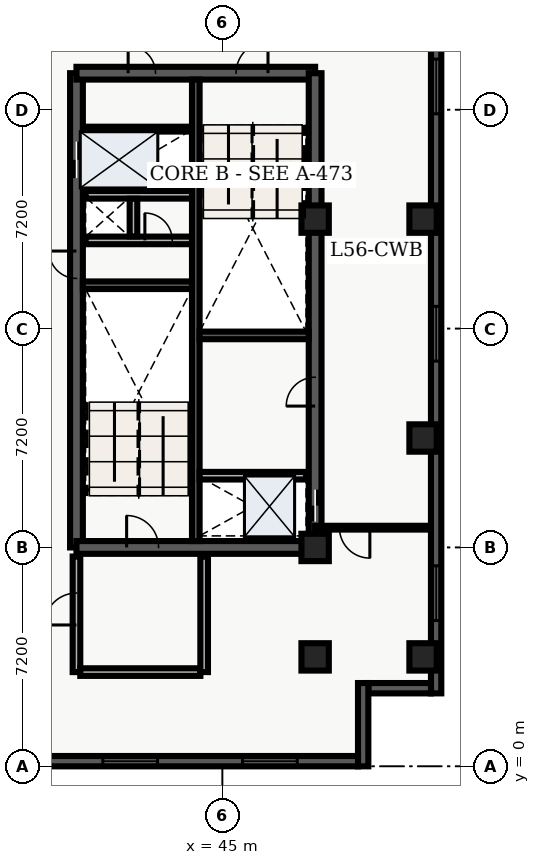
"""IFC4 building model, lengths in metres.
Left out: names, types, materials, properties, quantities, classifications, styles, units other than length and angle.
Written with IfcOpenShell. Run it as: python <this file> out.ifc"""

import sys

from ifc_helpers import new_model, entity, si_unit, converted_unit, direction, frame, origin_with_axes, origin_2d_with_axis, place, context, subcontext, project, spatial, polyline, rectangle, outline, extrude, element, fill, save


model = new_model("IFC4")
c1 = context("Model", 3, precision=1e-05, world=origin_with_axes(), true_north=direction((0.0, 1.0)))
c2 = subcontext(c1, "Body", "Model", "MODEL_VIEW")
j1 = project(units=[si_unit("LENGTHUNIT", "METRE"), converted_unit("PLANEANGLEUNIT", "DEGREE", entity("IfcPlaneAngleMeasure", 0.017), si_unit("PLANEANGLEUNIT", "RADIAN"), dimensions=[0, 0, 0, 0, 0, 0, 0])], contexts=[c1])
p1 = place(None, origin_with_axes())
s1 = spatial("IfcSite", under=j1, at=p1, CompositionType="ELEMENT")
p2 = place(p1, origin_with_axes())
s2 = spatial("IfcBuilding", under=s1, at=p2, CompositionType="ELEMENT")
p3 = place(p2, frame((0.0, 0.0, 228.6), z_axis=(0.0, 0.0, 1.0), x_axis=(1.0, 0.0, 0.0)))
s3 = spatial("IfcBuildingStorey", under=s2, at=p3, CompositionType="ELEMENT", Elevation=228.6)
p4 = place(p3, frame((40.2, 7.2, 0.0), z_axis=(0.0, 0.0, 1.0), x_axis=(0.0, 1.0, 0.0)))
e1 = element("IfcWall", 1, at=p4, inside=s3, PredefinedType="SHEAR", context=c2, shape_type="SweptSolid", body=[
    extrude(outline(polyline([(0.0, -0.21), (15.6, -0.21), (15.6, 0.21), (0.0, 0.21), (0.0, -0.21)])), origin_with_axes(), (0.0, 0.0, 1.0), 3.66),
])
p5 = place(p4, frame((12.75, 0.0, 0.0), z_axis=(0.0, 0.0, 1.0), x_axis=(1.0, 0.0, 0.0)))
e2 = element("IfcOpeningElement", 2, at=p5, cuts=e1, PredefinedType="OPENING", context=c2, shape_type="SweptSolid", body=[
    extrude(rectangle(XDim=1.2, YDim=0.44, at=origin_2d_with_axis()), origin_with_axes(), (0.0, 0.0, 1.0), 2.15),
])
p6 = place(p4, frame((9.3, 0.0, 0.0), z_axis=(0.0, 0.0, 1.0), x_axis=(1.0, 0.0, 0.0)))
e3 = element("IfcOpeningElement", 3, at=p6, cuts=e1, PredefinedType="OPENING", context=c2, shape_type="SweptSolid", body=[
    extrude(rectangle(XDim=0.9, YDim=0.44, at=origin_2d_with_axis()), origin_with_axes(), (0.0, 0.0, 1.0), 2.15),
])
p7 = place(p3, frame((40.2, 7.2, 0.0), z_axis=(0.0, 0.0, 1.0), x_axis=(1.0, 0.0, 0.0)))
e4 = element("IfcWall", 4, at=p7, inside=s3, PredefinedType="SHEAR", context=c2, shape_type="SweptSolid", body=[
    extrude(outline(polyline([(0.0, -0.21), (7.85, -0.21), (7.85, 0.21), (0.0, 0.21), (0.0, -0.21)])), origin_with_axes(), (0.0, 0.0, 1.0), 3.66),
])
p8 = place(p7, frame((2.175, 0.0, 0.0), z_axis=(0.0, 0.0, 1.0), x_axis=(1.0, 0.0, 0.0)))
e5 = element("IfcOpeningElement", 5, at=p8, cuts=e4, PredefinedType="OPENING", context=c2, shape_type="SweptSolid", body=[
    extrude(rectangle(XDim=1.05, YDim=0.44, at=origin_2d_with_axis()), origin_with_axes(), (0.0, 0.0, 1.0), 2.15),
])
p9 = place(p3, frame((40.2, 22.8, 0.0), z_axis=(0.0, 0.0, 1.0), x_axis=(1.0, 0.0, 0.0)))
e6 = element("IfcWall", 6, at=p9, inside=s3, PredefinedType="SHEAR", context=c2, shape_type="SweptSolid", body=[
    extrude(outline(polyline([(0.0, -0.21), (7.85, -0.21), (7.85, 0.21), (0.0, 0.21), (0.0, -0.21)])), origin_with_axes(), (0.0, 0.0, 1.0), 3.66),
])
p10 = place(p9, frame((5.775, 0.0, 0.0), z_axis=(0.0, 0.0, 1.0), x_axis=(1.0, 0.0, 0.0)))
e7 = element("IfcOpeningElement", 7, at=p10, cuts=e6, PredefinedType="OPENING", context=c2, shape_type="SweptSolid", body=[
    extrude(rectangle(XDim=1.05, YDim=0.44, at=origin_2d_with_axis()), origin_with_axes(), (0.0, 0.0, 1.0), 2.15),
])
p11 = place(p9, frame((2.15, 0.0, 0.0), z_axis=(0.0, 0.0, 1.0), x_axis=(1.0, 0.0, 0.0)))
e8 = element("IfcOpeningElement", 8, at=p11, cuts=e6, PredefinedType="OPENING", context=c2, shape_type="SweptSolid", body=[
    extrude(rectangle(XDim=0.9, YDim=0.44, at=origin_2d_with_axis()), origin_with_axes(), (0.0, 0.0, 1.0), 2.15),
])
p12 = place(p3, frame((48.05, 7.2, 0.0), z_axis=(0.0, 0.0, 1.0), x_axis=(0.0, 1.0, 0.0)))
e9 = element("IfcWall", 9, at=p12, inside=s3, PredefinedType="SHEAR", context=c2, shape_type="SweptSolid", body=[
    extrude(outline(polyline([(0.0, -0.21), (15.6, -0.21), (15.6, 0.21), (0.0, 0.21), (0.0, -0.21)])), origin_with_axes(), (0.0, 0.0, 1.0), 3.66),
])
p13 = place(p12, frame((1.375, 0.0, 0.0), z_axis=(0.0, 0.0, 1.0), x_axis=(1.0, 0.0, 0.0)))
e10 = element("IfcOpeningElement", 10, at=p13, cuts=e9, PredefinedType="OPENING", context=c2, shape_type="SweptSolid", body=[
    extrude(rectangle(XDim=1.05, YDim=0.44, at=origin_2d_with_axis()), origin_with_axes(), (0.0, 0.0, 1.0), 2.15),
])
p14 = place(p12, frame((5.125, 0.0, 0.0), z_axis=(0.0, 0.0, 1.0), x_axis=(1.0, 0.0, 0.0)))
e11 = element("IfcOpeningElement", 11, at=p14, cuts=e9, PredefinedType="OPENING", context=c2, shape_type="SweptSolid", body=[
    extrude(rectangle(XDim=0.95, YDim=0.44, at=origin_2d_with_axis()), origin_with_axes(), (0.0, 0.0, 1.0), 2.15),
])
p15 = place(p3, frame((44.125, 7.41, 0.0), z_axis=(0.0, 0.0, 1.0), x_axis=(0.0, 1.0, 0.0)))
e12 = element("IfcWall", 12, at=p15, inside=s3, PredefinedType="SHEAR", context=c2, shape_type="SweptSolid", body=[
    extrude(outline(polyline([(0.0, -0.125), (15.18, -0.125), (15.18, 0.125), (0.0, 0.125), (0.0, -0.125)])), origin_with_axes(), (0.0, 0.0, 1.0), 3.66),
])
for number, where, z_axis, x_axis in (
    (13, (40.41, 15.825, 0.0), (0.0, 0.0, 1.0), (1.0, 0.0, 0.0)),
    (14, (44.25, 14.175, 0.0), (0.0, 0.0, 1.0), (1.0, 0.0, 0.0)),
):
    element("IfcWall", number, at=place(p3, frame(where, z_axis=z_axis, x_axis=x_axis)), inside=s3, PredefinedType="SHEAR", context=c2, shape_type="SweptSolid", body=[
        extrude(outline(polyline([(0.0, -0.125), (3.59, -0.125), (3.59, 0.125), (0.0, 0.125), (0.0, -0.125)])), origin_with_axes(), (0.0, 0.0, 1.0), 3.66),
    ])
p16 = place(p3, frame((40.5, 17.3, 0.0), z_axis=(0.0, 0.0, 1.0), x_axis=(1.0, 0.0, 0.0)))
e15 = element("IfcWall", 15, at=p16, inside=s3, PredefinedType="SOLIDWALL", context=c2, shape_type="SweptSolid", body=[
    extrude(outline(polyline([(0.0, -0.125), (3.5, -0.125), (3.5, 0.125), (0.0, 0.125), (0.0, -0.125)])), origin_with_axes(), (0.0, 0.0, 1.0), 2.7),
])
p17 = place(p16, frame((2.4, 0.0, 0.0), z_axis=(0.0, 0.0, 1.0), x_axis=(1.0, 0.0, 0.0)))
e16 = element("IfcOpeningElement", 16, at=p17, cuts=e15, PredefinedType="OPENING", context=c2, shape_type="SweptSolid", body=[
    extrude(rectangle(XDim=0.9, YDim=0.27, at=origin_2d_with_axis()), origin_with_axes(), (0.0, 0.0, 1.0), 2.15),
])
p18 = place(p3, frame((40.5, 18.8, 0.0), z_axis=(0.0, 0.0, 1.0), x_axis=(1.0, 0.0, 0.0)))
e17 = element("IfcWall", 17, at=p18, inside=s3, PredefinedType="SOLIDWALL", context=c2, shape_type="SweptSolid", body=[
    extrude(outline(polyline([(0.0, -0.125), (3.5, -0.125), (3.5, 0.125), (0.0, 0.125), (0.0, -0.125)])), origin_with_axes(), (0.0, 0.0, 1.0), 2.7),
])
p19 = place(p3, frame((42.075, 17.43, 0.0), z_axis=(0.0, 0.0, 1.0), x_axis=(0.0, 1.0, 0.0)))
e18 = element("IfcWall", 18, at=p19, inside=s3, PredefinedType="SOLIDWALL", context=c2, shape_type="SweptSolid", body=[
    extrude(outline(polyline([(0.0, -0.125), (1.24, -0.125), (1.24, 0.125), (0.0, 0.125), (0.0, -0.125)])), origin_with_axes(), (0.0, 0.0, 1.0), 2.7),
])
p20 = place(p3, frame((40.2, 3.1, 0.0), z_axis=(0.0, 0.0, 1.0), x_axis=(0.0, 1.0, 0.0)))
e19 = element("IfcWall", 19, at=p20, inside=s3, PredefinedType="SOLIDWALL", context=c2, shape_type="SweptSolid", body=[
    extrude(outline(polyline([(0.0, -0.125), (3.8, -0.125), (3.8, 0.125), (0.0, 0.125), (0.0, -0.125)])), origin_with_axes(), (0.0, 0.0, 1.0), 2.7),
])
p21 = place(p20, frame((2.075, 0.0, 0.0), z_axis=(0.0, 0.0, 1.0), x_axis=(1.0, 0.0, 0.0)))
e20 = element("IfcOpeningElement", 20, at=p21, cuts=e19, PredefinedType="OPENING", context=c2, shape_type="SweptSolid", body=[
    extrude(rectangle(XDim=1.05, YDim=0.27, at=origin_2d_with_axis()), origin_with_axes(), (0.0, 0.0, 1.0), 2.15),
])
p22 = place(p3, frame((40.325, 3.1, 0.0), z_axis=(0.0, 0.0, 1.0), x_axis=(1.0, 0.0, 0.0)))
e21 = element("IfcWall", 21, at=p22, inside=s3, PredefinedType="SOLIDWALL", context=c2, shape_type="SweptSolid", body=[
    extrude(outline(polyline([(0.0, -0.125), (3.95, -0.125), (3.95, 0.125), (0.0, 0.125), (0.0, -0.125)])), origin_with_axes(), (0.0, 0.0, 1.0), 2.7),
])
p23 = place(p3, frame((44.4, 3.1, 0.0), z_axis=(0.0, 0.0, 1.0), x_axis=(0.0, 1.0, 0.0)))
e22 = element("IfcWall", 22, at=p23, inside=s3, PredefinedType="SOLIDWALL", context=c2, shape_type="SweptSolid", body=[
    extrude(outline(polyline([(0.0, -0.125), (3.8, -0.125), (3.8, 0.125), (0.0, 0.125), (0.0, -0.125)])), origin_with_axes(), (0.0, 0.0, 1.0), 2.7),
])
for number, where, z_axis, x_axis in (
    (23, (48.05, 3.6, 0.0), (0.0, 0.0, 1.0), (1.0, 0.0, 0.0)),
    (24, (48.05, 7.2, 0.0), (0.0, 0.0, 1.0), (1.0, 0.0, 0.0)),
    (25, (48.05, 18.0, 0.0), (0.0, 0.0, 1.0), (1.0, 0.0, 0.0)),
    (26, (51.6, 3.6, 0.0), (0.0, 0.0, 1.0), (1.0, 0.0, 0.0)),
    (27, (51.6, 10.8, 0.0), (0.0, 0.0, 1.0), (1.0, 0.0, 0.0)),
    (28, (51.6, 18.0, 0.0), (0.0, 0.0, 1.0), (1.0, 0.0, 0.0)),
):
    element("IfcColumn", number, at=place(p3, frame(where, z_axis=z_axis, x_axis=x_axis)), inside=s3, PredefinedType="COLUMN", context=c2, shape_type="SweptSolid", body=[
        extrude(rectangle(XDim=0.9, YDim=0.9, at=origin_2d_with_axis()), origin_with_axes(), (0.0, 0.0, 1.0), 3.9),
    ])
p24 = place(p3, frame((40.5, 20.96, 0.0), z_axis=(0.0, 0.0, 1.0), x_axis=(1.0, 0.0, 0.0)))
e29 = element("IfcWall", 29, at=p24, inside=s3, PredefinedType="PARTITIONING", context=c2, shape_type="SweptSolid", body=[
    extrude(outline(polyline([(0.0, -0.08), (3.5, -0.08), (3.5, 0.08), (0.0, 0.08), (0.0, -0.08)])), origin_with_axes(), (0.0, 0.0, 1.0), 2.7),
])
p25 = place(p3, frame((44.25, 9.56, 0.0), z_axis=(0.0, 0.0, 1.0), x_axis=(1.0, 0.0, 0.0)))
e30 = element("IfcWall", 30, at=p25, inside=s3, PredefinedType="SOLIDWALL", context=c2, shape_type="SweptSolid", body=[
    extrude(outline(polyline([(0.0, -0.125), (3.5, -0.125), (3.5, 0.125), (0.0, 0.125), (0.0, -0.125)])), origin_with_axes(), (0.0, 0.0, 1.0), 2.7),
])
p26 = place(p3, frame((51.865, 7.85, 0.0), z_axis=(0.0, 0.0, 1.0), x_axis=(-1.0, 0.0, 0.0)))
e31 = element("IfcWall", 31, at=p26, inside=s3, PredefinedType="PARTITIONING", context=c2, shape_type="SweptSolid", body=[
    extrude(outline(polyline([(0.0, -0.062), (3.815, -0.062), (3.815, 0.062), (0.0, 0.062), (0.0, -0.062)])), origin_with_axes(), (0.0, 0.0, 1.0), 2.7),
])
p27 = place(p26, frame((2.515, 0.0, 0.0), z_axis=(0.0, 0.0, 1.0), x_axis=(1.0, 0.0, 0.0)))
e32 = element("IfcOpeningElement", 32, at=p27, cuts=e31, PredefinedType="OPENING", context=c2, shape_type="SweptSolid", body=[
    extrude(rectangle(XDim=1.0, YDim=0.145, at=origin_2d_with_axis()), origin_with_axes(), (0.0, 0.0, 1.0), 2.15),
])
p28 = place(p3, frame((52.03, 26.06, 0.0), z_axis=(0.0, 0.0, 1.0), x_axis=(0.0, -1.0, 0.0)))
e33 = element("IfcWall", 33, at=p28, inside=s3, PredefinedType="SOLIDWALL", context=c2, shape_type="SweptSolid", body=[
    extrude(outline(polyline([(0.0, -0.17), (23.66, -0.17), (23.66, 0.17), (0.0, 0.17), (0.0, -0.17)])), origin_with_axes(), (0.0, 0.0, 1.0), 3.66),
])
p29 = place(p28, frame((3.696, 0.0, 0.45), z_axis=(0.0, 0.0, 1.0), x_axis=(1.0, 0.0, 0.0)))
e34 = element("IfcOpeningElement", 34, at=p29, cuts=e33, PredefinedType="OPENING", context=c2, shape_type="SweptSolid", body=[
    extrude(rectangle(XDim=1.8, YDim=0.36, at=origin_2d_with_axis()), origin_with_axes(), (0.0, 0.0, 1.0), 2.1),
])
p30 = place(p28, frame((11.83, 0.0, 0.45), z_axis=(0.0, 0.0, 1.0), x_axis=(1.0, 0.0, 0.0)))
e35 = element("IfcOpeningElement", 35, at=p30, cuts=e33, PredefinedType="OPENING", context=c2, shape_type="SweptSolid", body=[
    extrude(rectangle(XDim=1.8, YDim=0.36, at=origin_2d_with_axis()), origin_with_axes(), (0.0, 0.0, 1.0), 2.1),
])
p31 = place(p28, frame((20.364, 0.0, 0.45), z_axis=(0.0, 0.0, 1.0), x_axis=(1.0, 0.0, 0.0)))
e36 = element("IfcOpeningElement", 36, at=p31, cuts=e33, PredefinedType="OPENING", context=c2, shape_type="SweptSolid", body=[
    extrude(rectangle(XDim=1.8, YDim=0.36, at=origin_2d_with_axis()), origin_with_axes(), (0.0, 0.0, 1.0), 2.1),
])
p32 = place(p3, frame((51.86, 2.57, 0.0), z_axis=(0.0, 0.0, 1.0), x_axis=(-1.0, 0.0, 0.0)))
e37 = element("IfcWall", 37, at=p32, inside=s3, PredefinedType="SOLIDWALL", context=c2, shape_type="SweptSolid", body=[
    extrude(outline(polyline([(0.0, -0.17), (2.06, -0.17), (2.06, 0.17), (0.0, 0.17), (0.0, -0.17)])), origin_with_axes(), (0.0, 0.0, 1.0), 3.66),
])
p33 = place(p3, frame((49.63, 2.74, 0.0), z_axis=(0.0, 0.0, 1.0), x_axis=(0.0, -1.0, 0.0)))
e38 = element("IfcWall", 38, at=p33, inside=s3, PredefinedType="SOLIDWALL", context=c2, shape_type="SweptSolid", body=[
    extrude(outline(polyline([(0.0, -0.17), (2.74, -0.17), (2.74, 0.17), (0.0, 0.17), (0.0, -0.17)])), origin_with_axes(), (0.0, 0.0, 1.0), 3.66),
])
p34 = place(p3, frame((49.46, 0.17, 0.0), z_axis=(0.0, 0.0, 1.0), x_axis=(-1.0, 0.0, 0.0)))
e39 = element("IfcWall", 39, at=p34, inside=s3, PredefinedType="SOLIDWALL", context=c2, shape_type="SweptSolid", body=[
    extrude(outline(polyline([(0.0, -0.17), (42.56, -0.17), (42.56, 0.17), (0.0, 0.17), (0.0, -0.17)])), origin_with_axes(), (0.0, 0.0, 1.0), 3.66),
])
p35 = place(p34, frame((2.898, 0.0, 0.45), z_axis=(0.0, 0.0, 1.0), x_axis=(1.0, 0.0, 0.0)))
e40 = element("IfcOpeningElement", 40, at=p35, cuts=e39, PredefinedType="OPENING", context=c2, shape_type="SweptSolid", body=[
    extrude(rectangle(XDim=1.8, YDim=0.36, at=origin_2d_with_axis()), origin_with_axes(), (0.0, 0.0, 1.0), 2.1),
])
p36 = place(p34, frame((7.493, 0.0, 0.45), z_axis=(0.0, 0.0, 1.0), x_axis=(1.0, 0.0, 0.0)))
e41 = element("IfcOpeningElement", 41, at=p36, cuts=e39, PredefinedType="OPENING", context=c2, shape_type="SweptSolid", body=[
    extrude(rectangle(XDim=1.8, YDim=0.36, at=origin_2d_with_axis()), origin_with_axes(), (0.0, 0.0, 1.0), 2.1),
])
p37 = place(p34, frame((12.089, 0.0, 0.45), z_axis=(0.0, 0.0, 1.0), x_axis=(1.0, 0.0, 0.0)))
e42 = element("IfcOpeningElement", 42, at=p37, cuts=e39, PredefinedType="OPENING", context=c2, shape_type="SweptSolid", body=[
    extrude(rectangle(XDim=1.8, YDim=0.36, at=origin_2d_with_axis()), origin_with_axes(), (0.0, 0.0, 1.0), 2.1),
])
p38 = place(p34, frame((16.234, 0.0, 0.45), z_axis=(0.0, 0.0, 1.0), x_axis=(1.0, 0.0, 0.0)))
e43 = element("IfcOpeningElement", 43, at=p38, cuts=e39, PredefinedType="OPENING", context=c2, shape_type="SweptSolid", body=[
    extrude(rectangle(XDim=1.8, YDim=0.36, at=origin_2d_with_axis()), origin_with_axes(), (0.0, 0.0, 1.0), 2.1),
])
p39 = place(p34, frame((25.876, 0.0, 0.45), z_axis=(0.0, 0.0, 1.0), x_axis=(1.0, 0.0, 0.0)))
e44 = element("IfcOpeningElement", 44, at=p39, cuts=e39, PredefinedType="OPENING", context=c2, shape_type="SweptSolid", body=[
    extrude(rectangle(XDim=1.8, YDim=0.36, at=origin_2d_with_axis()), origin_with_axes(), (0.0, 0.0, 1.0), 2.1),
])
p40 = place(p34, frame((30.471, 0.0, 0.45), z_axis=(0.0, 0.0, 1.0), x_axis=(1.0, 0.0, 0.0)))
e45 = element("IfcOpeningElement", 45, at=p40, cuts=e39, PredefinedType="OPENING", context=c2, shape_type="SweptSolid", body=[
    extrude(rectangle(XDim=1.8, YDim=0.36, at=origin_2d_with_axis()), origin_with_axes(), (0.0, 0.0, 1.0), 2.1),
])
p41 = place(p34, frame((35.067, 0.0, 0.45), z_axis=(0.0, 0.0, 1.0), x_axis=(1.0, 0.0, 0.0)))
e46 = element("IfcOpeningElement", 46, at=p41, cuts=e39, PredefinedType="OPENING", context=c2, shape_type="SweptSolid", body=[
    extrude(rectangle(XDim=1.8, YDim=0.36, at=origin_2d_with_axis()), origin_with_axes(), (0.0, 0.0, 1.0), 2.1),
])
p42 = place(p34, frame((39.662, 0.0, 0.45), z_axis=(0.0, 0.0, 1.0), x_axis=(1.0, 0.0, 0.0)))
e47 = element("IfcOpeningElement", 47, at=p42, cuts=e39, PredefinedType="OPENING", context=c2, shape_type="SweptSolid", body=[
    extrude(rectangle(XDim=1.8, YDim=0.36, at=origin_2d_with_axis()), origin_with_axes(), (0.0, 0.0, 1.0), 2.1),
])
p43 = place(p12, frame((1.375, 0.0, 0.0), z_axis=(0.0, 0.0, 1.0), x_axis=(1.0, 0.0, 0.0)))
e48 = element("IfcDoor", 48, at=p43, inside=s3, OperationType="SLIDING_TO_LEFT", PredefinedType="DOOR", context=c2, shape_type="SweptSolid", body=[
    extrude(rectangle(XDim=1.05, YDim=0.09, at=origin_2d_with_axis()), origin_with_axes(), (0.0, 0.0, 1.0), 2.15),
])
fill(e10, e48)
p44 = place(p4, frame((12.75, 0.0, 0.0), z_axis=(0.0, 0.0, 1.0), x_axis=(1.0, 0.0, 0.0)))
e49 = element("IfcDoor", 49, at=p44, inside=s3, OperationType="DOUBLE_DOOR_SLIDING", PredefinedType="DOOR", context=c2, shape_type="SweptSolid", body=[
    extrude(rectangle(XDim=1.2, YDim=0.09, at=origin_2d_with_axis()), origin_with_axes(), (0.0, 0.0, 1.0), 2.15),
])
fill(e2, e49)
p45 = place(p4, frame((9.3, 0.0, 0.0), z_axis=(0.0, 0.0, 1.0), x_axis=(1.0, 0.0, 0.0)))
e50 = element("IfcDoor", 50, at=p45, inside=s3, OperationType="SINGLE_SWING_RIGHT", PredefinedType="DOOR", context=c2, shape_type="SweptSolid", body=[
    extrude(rectangle(XDim=0.9, YDim=0.09, at=origin_2d_with_axis()), origin_with_axes(), (0.0, 0.0, 1.0), 2.15),
])
fill(e3, e50)
p46 = place(p16, frame((2.4, 0.0, 0.0), z_axis=(0.0, 0.0, 1.0), x_axis=(1.0, 0.0, 0.0)))
e51 = element("IfcDoor", 51, at=p46, inside=s3, OperationType="SINGLE_SWING_LEFT", PredefinedType="DOOR", context=c2, shape_type="SweptSolid", body=[
    extrude(rectangle(XDim=0.9, YDim=0.09, at=origin_2d_with_axis()), origin_with_axes(), (0.0, 0.0, 1.0), 2.15),
])
fill(e16, e51)
p47 = place(p7, frame((2.175, 0.0, 0.0), z_axis=(0.0, 0.0, 1.0), x_axis=(1.0, 0.0, 0.0)))
e52 = element("IfcDoor", 52, at=p47, inside=s3, OperationType="SINGLE_SWING_LEFT", PredefinedType="DOOR", context=c2, shape_type="SweptSolid", body=[
    extrude(rectangle(XDim=1.05, YDim=0.09, at=origin_2d_with_axis()), origin_with_axes(), (0.0, 0.0, 1.0), 2.15),
])
fill(e5, e52)
p48 = place(p9, frame((5.775, 0.0, 0.0), z_axis=(0.0, 0.0, 1.0), x_axis=(1.0, 0.0, 0.0)))
e53 = element("IfcDoor", 53, at=p48, inside=s3, OperationType="SINGLE_SWING_RIGHT", PredefinedType="DOOR", context=c2, shape_type="SweptSolid", body=[
    extrude(rectangle(XDim=1.05, YDim=0.09, at=origin_2d_with_axis()), origin_with_axes(), (0.0, 0.0, 1.0), 2.15),
])
fill(e7, e53)
p49 = place(p20, frame((2.075, 0.0, 0.0), z_axis=(0.0, 0.0, 1.0), x_axis=(1.0, 0.0, 0.0)))
e54 = element("IfcDoor", 54, at=p49, inside=s3, OperationType="SINGLE_SWING_LEFT", PredefinedType="DOOR", context=c2, shape_type="SweptSolid", body=[
    extrude(rectangle(XDim=1.05, YDim=0.09, at=origin_2d_with_axis()), origin_with_axes(), (0.0, 0.0, 1.0), 2.15),
])
fill(e20, e54)
p50 = place(p9, frame((2.15, 0.0, 0.0), z_axis=(0.0, 0.0, 1.0), x_axis=(1.0, 0.0, 0.0)))
e55 = element("IfcDoor", 55, at=p50, inside=s3, OperationType="SINGLE_SWING_LEFT", PredefinedType="DOOR", context=c2, shape_type="SweptSolid", body=[
    extrude(rectangle(XDim=0.9, YDim=0.09, at=origin_2d_with_axis()), origin_with_axes(), (0.0, 0.0, 1.0), 2.15),
])
fill(e8, e55)
p51 = place(p12, frame((5.125, 0.0, 0.0), z_axis=(0.0, 0.0, 1.0), x_axis=(1.0, 0.0, 0.0)))
e56 = element("IfcDoor", 56, at=p51, inside=s3, OperationType="SINGLE_SWING_LEFT", PredefinedType="DOOR", context=c2, shape_type="SweptSolid", body=[
    extrude(rectangle(XDim=0.95, YDim=0.09, at=origin_2d_with_axis()), origin_with_axes(), (0.0, 0.0, 1.0), 2.15),
])
fill(e11, e56)
p52 = place(p26, frame((2.515, 0.0, 0.0), z_axis=(0.0, 0.0, 1.0), x_axis=(1.0, 0.0, 0.0)))
e57 = element("IfcDoor", 57, at=p52, inside=s3, OperationType="SINGLE_SWING_LEFT", PredefinedType="DOOR", context=c2, shape_type="SweptSolid", body=[
    extrude(rectangle(XDim=1.0, YDim=0.075, at=origin_2d_with_axis()), origin_with_axes(), (0.0, 0.0, 1.0), 2.15),
])
fill(e32, e57)
p53 = place(p28, frame((3.696, 0.0, 0.45), z_axis=(0.0, 0.0, 1.0), x_axis=(1.0, 0.0, 0.0)))
e58 = element("IfcWindow", 58, at=p53, inside=s3, PredefinedType="WINDOW", context=c2, shape_type="SweptSolid", body=[
    extrude(rectangle(XDim=1.8, YDim=0.09, at=origin_2d_with_axis()), origin_with_axes(), (0.0, 0.0, 1.0), 2.1),
])
fill(e34, e58)
p54 = place(p28, frame((11.83, 0.0, 0.45), z_axis=(0.0, 0.0, 1.0), x_axis=(1.0, 0.0, 0.0)))
e59 = element("IfcWindow", 59, at=p54, inside=s3, PredefinedType="WINDOW", context=c2, shape_type="SweptSolid", body=[
    extrude(rectangle(XDim=1.8, YDim=0.09, at=origin_2d_with_axis()), origin_with_axes(), (0.0, 0.0, 1.0), 2.1),
])
fill(e35, e59)
p55 = place(p28, frame((20.364, 0.0, 0.45), z_axis=(0.0, 0.0, 1.0), x_axis=(1.0, 0.0, 0.0)))
e60 = element("IfcWindow", 60, at=p55, inside=s3, PredefinedType="WINDOW", context=c2, shape_type="SweptSolid", body=[
    extrude(rectangle(XDim=1.8, YDim=0.09, at=origin_2d_with_axis()), origin_with_axes(), (0.0, 0.0, 1.0), 2.1),
])
fill(e36, e60)
p56 = place(p34, frame((2.898, 0.0, 0.45), z_axis=(0.0, 0.0, 1.0), x_axis=(1.0, 0.0, 0.0)))
e61 = element("IfcWindow", 61, at=p56, inside=s3, PredefinedType="WINDOW", context=c2, shape_type="SweptSolid", body=[
    extrude(rectangle(XDim=1.8, YDim=0.09, at=origin_2d_with_axis()), origin_with_axes(), (0.0, 0.0, 1.0), 2.1),
])
fill(e40, e61)
p57 = place(p34, frame((7.493, 0.0, 0.45), z_axis=(0.0, 0.0, 1.0), x_axis=(1.0, 0.0, 0.0)))
e62 = element("IfcWindow", 62, at=p57, inside=s3, PredefinedType="WINDOW", context=c2, shape_type="SweptSolid", body=[
    extrude(rectangle(XDim=1.8, YDim=0.09, at=origin_2d_with_axis()), origin_with_axes(), (0.0, 0.0, 1.0), 2.1),
])
fill(e41, e62)
save(model, sys.argv[1])
